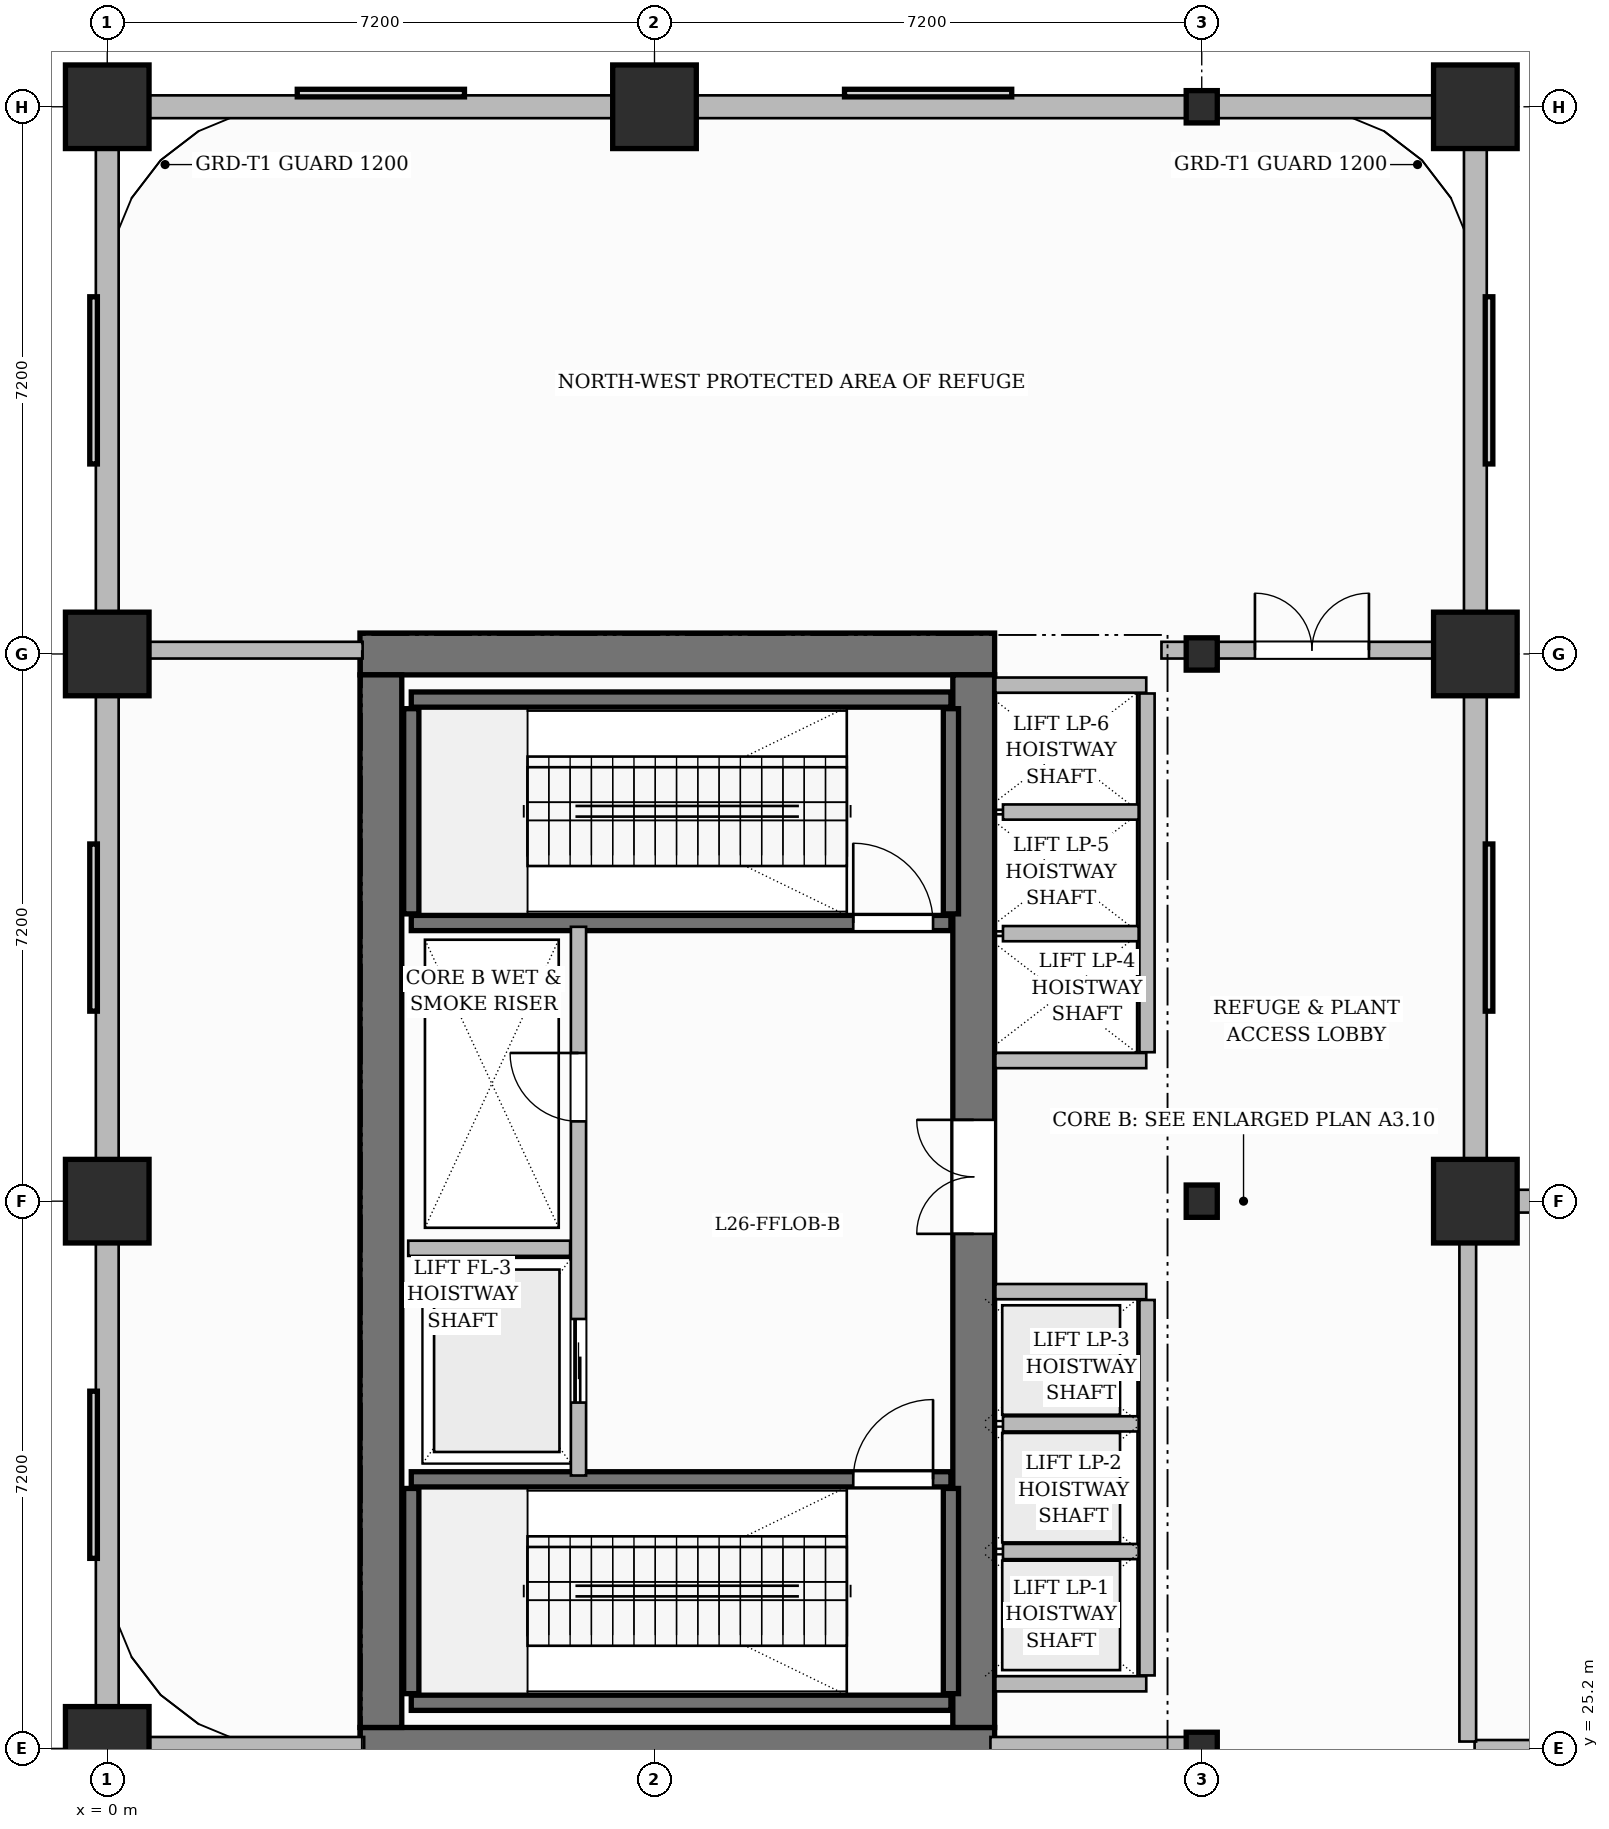
"""IFC4 building model, lengths in metres.
Left out: names, types, materials, properties, quantities, classifications, styles, units other than length and angle.
Written with IfcOpenShell. Run it as: python <this file> out.ifc"""

import sys

from ifc_helpers import new_model, si_unit, direction, frame, frame_2d, origin, origin_2d, place, context, subcontext, project, spatial, rectangle, i_section, extrude, source, transform, mapped, element, fill, save


model = new_model("IFC4")
c1 = context("Model", 3, precision=1e-05, world=origin(), true_north=direction((0.0, 1.0)))
c2 = subcontext(c1, "Body", "Model", "MODEL_VIEW")
j1 = project(units=[si_unit("LENGTHUNIT", "METRE"), si_unit("PLANEANGLEUNIT", "RADIAN")], contexts=[c1])
p1 = place(None, origin())
s1 = spatial("IfcSite", under=j1, at=p1, CompositionType="ELEMENT")
p2 = place(p1, origin())
s2 = spatial("IfcBuilding", under=s1, at=p2, CompositionType="ELEMENT")
p3 = place(p2, frame((0.0, 0.0, 106.4)))
s3 = spatial("IfcBuildingStorey", under=s2, at=p3, CompositionType="ELEMENT", Elevation=106.4)
for number, where, z_axis, x_axis in (
    (1, (3.325, 25.2, 0.0), (0.0, 0.0, 1.0), (1.0, 0.0, 0.0)),
    (2, (3.325, 39.6, 0.0), (0.0, 0.0, 1.0), (1.0, 0.0, 0.0)),
):
    element("IfcWall", number, at=place(p3, frame(where, z_axis=z_axis, x_axis=x_axis)), inside=s3, PredefinedType="SHEAR", context=c2, shape_type="SweptSolid", body=[
        extrude(rectangle(XDim=8.35, YDim=0.55, at=frame_2d((4.175, 0.0))), origin(), (0.0, 0.0, 1.0), 5.4),
    ])
p4 = place(p3, frame((3.6, 25.475, 0.0), z_axis=(0.0, 0.0, 1.0), x_axis=(0.0, 1.0, 0.0)))
e3 = element("IfcWall", 3, at=p4, inside=s3, PredefinedType="SHEAR", context=c2, shape_type="SweptSolid", body=[
    extrude(rectangle(XDim=13.85, YDim=0.55, at=frame_2d((6.925, 0.0))), origin(), (0.0, 0.0, 1.0), 5.4),
])
p5 = place(p3, frame((11.4, 25.475, 0.0), z_axis=(0.0, 0.0, 1.0), x_axis=(0.0, 1.0, 0.0)))
e4 = element("IfcWall", 4, at=p5, inside=s3, PredefinedType="SHEAR", context=c2, shape_type="SweptSolid", body=[
    extrude(rectangle(XDim=13.85, YDim=0.55, at=frame_2d((6.925, 0.0))), origin(), (0.0, 0.0, 1.0), 5.4),
])
p6 = place(p5, frame((6.495, 0.0, 0.0)))
e5 = element("IfcOpeningElement", 5, at=p6, cuts=e4, PredefinedType="OPENING", context=c2, shape_type="SweptSolid", body=[
    extrude(rectangle(XDim=1.5, YDim=2.2, at=frame_2d((0.75, 1.1))), frame((0.0, 0.285, 0.0), z_axis=(0.0, -1.0, 0.0), x_axis=(1.0, 0.0, 0.0)), (0.0, 0.0, 1.0), 0.57),
])
m1 = source(origin(), c2, "Body", "SweptSolid", [
    extrude(rectangle(XDim=1.1, YDim=1.1, at=origin_2d()), origin(), (0.0, 0.0, 1.0), 5.4),
])
for number, where, z_axis, x_axis in (
    (6, (0.0, 25.2, 0.0), (0.0, 0.0, 1.0), (1.0, 0.0, 0.0)),
    (7, (0.0, 32.4, 0.0), (0.0, 0.0, 1.0), (1.0, 0.0, 0.0)),
    (8, (0.0, 39.6, 0.0), (0.0, 0.0, 1.0), (1.0, 0.0, 0.0)),
    (9, (0.0, 46.8, 0.0), (0.0, 0.0, 1.0), (1.0, 0.0, 0.0)),
    (10, (7.2, 46.8, 0.0), (0.0, 0.0, 1.0), (1.0, 0.0, 0.0)),
):
    element("IfcColumn", number, at=place(p3, frame(where, z_axis=z_axis, x_axis=x_axis)), inside=s3, PredefinedType="COLUMN", context=c2, shape_type="MappedRepresentation", body=[
        mapped(m1, transform((0.0, 0.0, 0.0), scale=1.0)),
    ])
m2 = source(origin(), c2, "Body", "SweptSolid", [
    extrude(i_section(OverallWidth=0.409, OverallDepth=0.425, WebThickness=0.024, FlangeThickness=0.039, FilletRadius=0.015, at=origin_2d()), origin(), (0.0, 0.0, 1.0), 5.4),
])
for number, where, z_axis, x_axis in (
    (11, (14.4, 25.2, 0.0), (0.0, 0.0, 1.0), (1.0, 0.0, 0.0)),
    (12, (14.4, 32.4, 0.0), (0.0, 0.0, 1.0), (1.0, 0.0, 0.0)),
    (13, (14.4, 39.6, 0.0), (0.0, 0.0, 1.0), (1.0, 0.0, 0.0)),
    (14, (14.4, 46.8, 0.0), (0.0, 0.0, 1.0), (1.0, 0.0, 0.0)),
):
    element("IfcColumn", number, at=place(p3, frame(where, z_axis=z_axis, x_axis=x_axis)), inside=s3, PredefinedType="COLUMN", context=c2, shape_type="MappedRepresentation", body=[
        mapped(m2, transform((0.0, 0.0, 0.0), scale=1.0)),
    ])
for number, where, z_axis, x_axis in (
    (15, (18.0, 32.4, 0.0), (0.0, 0.0, 1.0), (1.0, 0.0, 0.0)),
    (16, (18.0, 39.6, 0.0), (0.0, 0.0, 1.0), (1.0, 0.0, 0.0)),
    (17, (18.0, 46.8, 0.0), (0.0, 0.0, 1.0), (1.0, 0.0, 0.0)),
):
    element("IfcColumn", number, at=place(p3, frame(where, z_axis=z_axis, x_axis=x_axis)), inside=s3, PredefinedType="COLUMN", context=c2, shape_type="MappedRepresentation", body=[
        mapped(m1, transform((0.0, 0.0, 0.0), scale=1.0)),
    ])
p7 = place(p3, frame((4.0, 25.8, 0.0), z_axis=(0.0, 0.0, 1.0), x_axis=(1.0, 0.0, 0.0)))
e18 = element("IfcWall", 18, at=p7, inside=s3, PredefinedType="SHEAR", context=c2, shape_type="SweptSolid", body=[
    extrude(rectangle(XDim=7.1, YDim=0.2, at=frame_2d((3.55, 0.0))), origin(), (0.0, 0.0, 1.0), 5.4),
])
for number, where, z_axis, x_axis in (
    (19, (4.0, 25.92, 0.0), (0.0, 0.0, 1.0), (0.0, 1.0, 0.0)),
    (20, (11.1, 25.92, 0.0), (0.0, 0.0, 1.0), (0.0, 1.0, 0.0)),
):
    element("IfcWall", number, at=place(p3, frame(where, z_axis=z_axis, x_axis=x_axis)), inside=s3, PredefinedType="SHEAR", context=c2, shape_type="SweptSolid", body=[
        extrude(rectangle(XDim=2.7, YDim=0.2, at=frame_2d((1.35, 0.0))), origin(), (0.0, 0.0, 1.0), 5.4),
    ])
p8 = place(p3, frame((4.0, 28.74, 0.0), z_axis=(0.0, 0.0, 1.0), x_axis=(1.0, 0.0, 0.0)))
e21 = element("IfcWall", 21, at=p8, inside=s3, PredefinedType="SHEAR", context=c2, shape_type="SweptSolid", body=[
    extrude(rectangle(XDim=7.1, YDim=0.2, at=frame_2d((3.55, 0.0))), origin(), (0.0, 0.0, 1.0), 5.4),
])
p9 = place(p8, frame((5.815, 0.0, 0.0)))
e22 = element("IfcOpeningElement", 22, at=p9, cuts=e21, PredefinedType="OPENING", context=c2, shape_type="SweptSolid", body=[
    extrude(rectangle(XDim=1.05, YDim=2.2, at=frame_2d((0.525, 1.1))), frame((0.0, 0.11, 0.0), z_axis=(0.0, -1.0, 0.0), x_axis=(1.0, 0.0, 0.0)), (0.0, 0.0, 1.0), 0.22),
])
p10 = place(p3, frame((4.0, 39.0, 0.0), z_axis=(0.0, 0.0, 1.0), x_axis=(1.0, 0.0, 0.0)))
e23 = element("IfcWall", 23, at=p10, inside=s3, PredefinedType="SHEAR", context=c2, shape_type="SweptSolid", body=[
    extrude(rectangle(XDim=7.1, YDim=0.2, at=frame_2d((3.55, 0.0))), origin(), (0.0, 0.0, 1.0), 5.4),
])
for number, where, z_axis, x_axis in (
    (24, (4.0, 36.18, 0.0), (0.0, 0.0, 1.0), (0.0, 1.0, 0.0)),
    (25, (11.1, 36.18, 0.0), (0.0, 0.0, 1.0), (0.0, 1.0, 0.0)),
):
    element("IfcWall", number, at=place(p3, frame(where, z_axis=z_axis, x_axis=x_axis)), inside=s3, PredefinedType="SHEAR", context=c2, shape_type="SweptSolid", body=[
        extrude(rectangle(XDim=2.7, YDim=0.2, at=frame_2d((1.35, 0.0))), origin(), (0.0, 0.0, 1.0), 5.4),
    ])
p11 = place(p3, frame((4.0, 36.06, 0.0), z_axis=(0.0, 0.0, 1.0), x_axis=(1.0, 0.0, 0.0)))
e26 = element("IfcWall", 26, at=p11, inside=s3, PredefinedType="SHEAR", context=c2, shape_type="SweptSolid", body=[
    extrude(rectangle(XDim=7.1, YDim=0.2, at=frame_2d((3.55, 0.0))), origin(), (0.0, 0.0, 1.0), 5.4),
])
p12 = place(p11, frame((5.815, 0.0, 0.0)))
e27 = element("IfcOpeningElement", 27, at=p12, cuts=e26, PredefinedType="OPENING", context=c2, shape_type="SweptSolid", body=[
    extrude(rectangle(XDim=1.05, YDim=2.2, at=frame_2d((0.525, 1.1))), frame((0.0, 0.11, 0.0), z_axis=(0.0, -1.0, 0.0), x_axis=(1.0, 0.0, 0.0)), (0.0, 0.0, 1.0), 0.22),
])
p13 = place(p3, frame((6.2, 28.79, 0.0), z_axis=(0.0, 0.0, 1.0), x_axis=(0.0, 1.0, 0.0)))
e28 = element("IfcWall", 28, at=p13, inside=s3, PredefinedType="PARTITIONING", context=c2, shape_type="SweptSolid", body=[
    extrude(rectangle(XDim=7.22, YDim=0.2, at=frame_2d((3.61, 0.0))), origin(), (0.0, 0.0, 1.0), 5.15),
])
p14 = place(p13, frame((4.66, 0.0, 0.0)))
e29 = element("IfcOpeningElement", 29, at=p14, cuts=e28, PredefinedType="OPENING", context=c2, shape_type="SweptSolid", body=[
    extrude(rectangle(XDim=0.9, YDim=2.1, at=frame_2d((0.45, 1.05))), frame((0.0, 0.11, 0.0), z_axis=(0.0, -1.0, 0.0), x_axis=(1.0, 0.0, 0.0)), (0.0, 0.0, 1.0), 0.22),
])
p15 = place(p13, frame((0.96, 0.0, 0.0)))
e30 = element("IfcOpeningElement", 30, at=p15, cuts=e28, PredefinedType="OPENING", context=c2, shape_type="SweptSolid", body=[
    extrude(rectangle(XDim=1.1, YDim=2.2, at=frame_2d((0.55, 1.1))), frame((0.0, 0.11, 0.0), z_axis=(0.0, -1.0, 0.0), x_axis=(1.0, 0.0, 0.0)), (0.0, 0.0, 1.0), 0.22),
])
p16 = place(p3, frame((3.96, 31.78, 0.0), z_axis=(0.0, 0.0, 1.0), x_axis=(1.0, 0.0, 0.0)))
e31 = element("IfcWall", 31, at=p16, inside=s3, PredefinedType="PARTITIONING", context=c2, shape_type="SweptSolid", body=[
    extrude(rectangle(XDim=2.13, YDim=0.2, at=frame_2d((1.065, 0.0))), origin(), (0.0, 0.0, 1.0), 5.15),
])
for number, where, z_axis, x_axis in (
    (32, (11.685, 26.05, 0.0), (0.0, 0.0, 1.0), (1.0, 0.0, 0.0)),
    (33, (11.685, 31.21, 0.0), (0.0, 0.0, 1.0), (1.0, 0.0, 0.0)),
):
    element("IfcWall", number, at=place(p3, frame(where, z_axis=z_axis, x_axis=x_axis)), inside=s3, PredefinedType="PARTITIONING", context=c2, shape_type="SweptSolid", body=[
        extrude(rectangle(XDim=1.985, YDim=0.2, at=frame_2d((0.992, 0.0))), origin(), (0.0, 0.0, 1.0), 5.15),
    ])
p17 = place(p3, frame((13.68, 26.16, 0.0), z_axis=(0.0, 0.0, 1.0), x_axis=(0.0, 1.0, 0.0)))
e34 = element("IfcWall", 34, at=p17, inside=s3, PredefinedType="PARTITIONING", context=c2, shape_type="SweptSolid", body=[
    extrude(rectangle(XDim=4.94, YDim=0.2, at=frame_2d((2.47, 0.0))), origin(), (0.0, 0.0, 1.0), 5.15),
])
for number, where, z_axis, x_axis in (
    (35, (11.785, 27.79, 0.0), (0.0, 0.0, 1.0), (1.0, 0.0, 0.0)),
    (36, (11.785, 29.47, 0.0), (0.0, 0.0, 1.0), (1.0, 0.0, 0.0)),
):
    element("IfcWall", number, at=place(p3, frame(where, z_axis=z_axis, x_axis=x_axis)), inside=s3, PredefinedType="PARTITIONING", context=c2, shape_type="SweptSolid", body=[
        extrude(rectangle(XDim=1.785, YDim=0.2, at=frame_2d((0.893, 0.0))), origin(), (0.0, 0.0, 1.0), 5.15),
    ])
for number, where, z_axis, x_axis in (
    (37, (11.685, 34.25, 0.0), (0.0, 0.0, 1.0), (1.0, 0.0, 0.0)),
    (38, (11.685, 39.19, 0.0), (0.0, 0.0, 1.0), (1.0, 0.0, 0.0)),
):
    element("IfcWall", number, at=place(p3, frame(where, z_axis=z_axis, x_axis=x_axis)), inside=s3, PredefinedType="PARTITIONING", context=c2, shape_type="SweptSolid", body=[
        extrude(rectangle(XDim=1.985, YDim=0.2, at=frame_2d((0.992, 0.0))), origin(), (0.0, 0.0, 1.0), 5.15),
    ])
p18 = place(p3, frame((13.68, 34.36, 0.0), z_axis=(0.0, 0.0, 1.0), x_axis=(0.0, 1.0, 0.0)))
e39 = element("IfcWall", 39, at=p18, inside=s3, PredefinedType="PARTITIONING", context=c2, shape_type="SweptSolid", body=[
    extrude(rectangle(XDim=4.72, YDim=0.2, at=frame_2d((2.36, 0.0))), origin(), (0.0, 0.0, 1.0), 5.15),
])
for number, where, z_axis, x_axis in (
    (40, (11.785, 35.92, 0.0), (0.0, 0.0, 1.0), (1.0, 0.0, 0.0)),
    (41, (11.785, 37.52, 0.0), (0.0, 0.0, 1.0), (1.0, 0.0, 0.0)),
):
    element("IfcWall", number, at=place(p3, frame(where, z_axis=z_axis, x_axis=x_axis)), inside=s3, PredefinedType="PARTITIONING", context=c2, shape_type="SweptSolid", body=[
        extrude(rectangle(XDim=1.785, YDim=0.2, at=frame_2d((0.893, 0.0))), origin(), (0.0, 0.0, 1.0), 5.15),
    ])
p19 = place(p3, frame((17.99, 25.2, 0.0), z_axis=(0.0, 0.0, 1.0), x_axis=(1.0, 0.0, 0.0)))
e42 = element("IfcWall", 42, at=p19, inside=s3, PredefinedType="PARTITIONING", context=c2, shape_type="SweptSolid", body=[
    extrude(rectangle(XDim=16.47, YDim=0.22, at=frame_2d((8.235, 0.0))), origin(), (0.0, 0.0, 1.0), 5.15),
])
p20 = place(p19, frame((1.46, 0.0, 0.0)))
e43 = element("IfcOpeningElement", 43, at=p20, cuts=e42, PredefinedType="OPENING", context=c2, shape_type="SweptSolid", body=[
    extrude(rectangle(XDim=1.5, YDim=2.2, at=frame_2d((0.75, 1.1))), frame((0.0, 0.12, 0.0), z_axis=(0.0, -1.0, 0.0), x_axis=(1.0, 0.0, 0.0)), (0.0, 0.0, 1.0), 0.24),
])
p21 = place(p3, frame((17.9, 25.29, 0.0), z_axis=(0.0, 0.0, 1.0), x_axis=(0.0, 1.0, 0.0)))
e44 = element("IfcWall", 44, at=p21, inside=s3, PredefinedType="PARTITIONING", context=c2, shape_type="SweptSolid", body=[
    extrude(rectangle(XDim=6.87, YDim=0.22, at=frame_2d((3.435, 0.0))), origin(), (0.0, 0.0, 1.0), 5.15),
])
p22 = place(p3, frame((13.87, 39.65, 0.0), z_axis=(0.0, 0.0, 1.0), x_axis=(1.0, 0.0, 0.0)))
e45 = element("IfcWall", 45, at=p22, inside=s3, PredefinedType="PARTITIONING", context=c2, shape_type="SweptSolid", body=[
    extrude(rectangle(XDim=3.89, YDim=0.22, at=frame_2d((1.945, 0.0))), origin(), (0.0, 0.0, 1.0), 4.485),
])
p23 = place(p22, frame((1.23, 0.0, 0.0)))
e46 = element("IfcOpeningElement", 46, at=p23, cuts=e45, PredefinedType="OPENING", context=c2, shape_type="SweptSolid", body=[
    extrude(rectangle(XDim=1.5, YDim=2.2, at=frame_2d((0.75, 1.1))), frame((0.0, 0.12, 0.0), z_axis=(0.0, -1.0, 0.0), x_axis=(1.0, 0.0, 0.0)), (0.0, 0.0, 1.0), 0.24),
])
p24 = place(p3, frame((0.29, 39.65, 0.0), z_axis=(0.0, 0.0, 1.0), x_axis=(1.0, 0.0, 0.0)))
e47 = element("IfcWall", 47, at=p24, inside=s3, PredefinedType="PARTITIONING", context=c2, shape_type="SweptSolid", body=[
    extrude(rectangle(XDim=3.07, YDim=0.22, at=frame_2d((1.535, 0.0))), origin(), (0.0, 0.0, 1.0), 5.15),
])
p25 = place(p3, frame((11.62, 25.2, 0.0), z_axis=(0.0, 0.0, 1.0), x_axis=(1.0, 0.0, 0.0)))
e48 = element("IfcWall", 48, at=p25, inside=s3, PredefinedType="SOLIDWALL", context=c2, shape_type="SweptSolid", body=[
    extrude(rectangle(XDim=2.78, YDim=0.3, at=frame_2d((1.39, 0.0))), origin(), (0.0, 0.0, 1.0), 4.485),
])
p26 = place(p3, frame((0.0, 25.2, 0.0), z_axis=(0.0, 0.0, 1.0), x_axis=(1.0, 0.0, 0.0)))
e49 = element("IfcWall", 49, at=p26, inside=s3, PredefinedType="SOLIDWALL", context=c2, shape_type="SweptSolid", body=[
    extrude(rectangle(XDim=3.38, YDim=0.3, at=frame_2d((1.69, 0.0))), origin(), (0.0, 0.0, 1.0), 5.15),
])
p27 = place(p3, frame((0.0, 25.25, 0.0), z_axis=(0.0, 0.0, 1.0), x_axis=(0.0, 1.0, 0.0)))
e50 = element("IfcWall", 50, at=p27, inside=s3, PredefinedType="SOLIDWALL", context=c2, shape_type="SweptSolid", body=[
    extrude(rectangle(XDim=21.5, YDim=0.3, at=frame_2d((10.75, 0.0))), origin(), (0.0, 0.0, 1.0), 4.485),
])
p28 = place(p3, frame((0.0, 46.8, 0.0), z_axis=(0.0, 0.0, 1.0), x_axis=(1.0, 0.0, 0.0)))
e51 = element("IfcWall", 51, at=p28, inside=s3, PredefinedType="SOLIDWALL", context=c2, shape_type="SweptSolid", body=[
    extrude(rectangle(XDim=18.0, YDim=0.3, at=frame_2d((9.0, 0.0))), origin(), (0.0, 0.0, 1.0), 4.485),
])
p29 = place(p3, frame((18.0, 32.4, 0.0), z_axis=(0.0, 0.0, 1.0), x_axis=(0.0, 1.0, 0.0)))
e52 = element("IfcWall", 52, at=p29, inside=s3, PredefinedType="SOLIDWALL", context=c2, shape_type="SweptSolid", body=[
    extrude(rectangle(XDim=14.35, YDim=0.3, at=frame_2d((7.175, 0.0))), origin(), (0.0, 0.0, 1.0), 5.15),
])
p30 = place(p3, frame((18.0, 32.4, 0.0), z_axis=(0.0, 0.0, 1.0), x_axis=(1.0, 0.0, 0.0)))
e53 = element("IfcWall", 53, at=p30, inside=s3, PredefinedType="SOLIDWALL", context=c2, shape_type="SweptSolid", body=[
    extrude(rectangle(XDim=16.8, YDim=0.3, at=frame_2d((8.4, 0.0))), origin(), (0.0, 0.0, 1.0), 4.335),
])
m3 = source(origin(), c2, "Body", "SweptSolid", [
    extrude(rectangle(XDim=1.05, YDim=2.2, at=frame_2d((0.525, 1.1))), frame((0.0, 0.025, 0.0), z_axis=(0.0, -1.0, 0.0), x_axis=(1.0, 0.0, 0.0)), (0.0, 0.0, 1.0), 0.05),
])
p31 = place(p9, origin())
e54 = element("IfcDoor", 54, at=p31, inside=s3, OperationType="SINGLE_SWING_RIGHT", PredefinedType="DOOR", context=c2, shape_type="MappedRepresentation", body=[
    mapped(m3, transform((0.0, 0.0, 0.0), scale=1.0)),
])
fill(e22, e54)
p32 = place(p12, origin())
e55 = element("IfcDoor", 55, at=p32, inside=s3, OperationType="SINGLE_SWING_LEFT", PredefinedType="DOOR", context=c2, shape_type="MappedRepresentation", body=[
    mapped(m3, transform((0.0, 0.0, 0.0), scale=1.0)),
])
fill(e27, e55)
m4 = source(origin(), c2, "Body", "SweptSolid", [
    extrude(rectangle(XDim=0.9, YDim=2.1, at=frame_2d((0.45, 1.05))), frame((0.0, 0.025, 0.0), z_axis=(0.0, -1.0, 0.0), x_axis=(1.0, 0.0, 0.0)), (0.0, 0.0, 1.0), 0.05),
])
p33 = place(p14, origin())
e56 = element("IfcDoor", 56, at=p33, inside=s3, OperationType="SINGLE_SWING_RIGHT", PredefinedType="DOOR", context=c2, shape_type="MappedRepresentation", body=[
    mapped(m4, transform((0.0, 0.0, 0.0), scale=1.0)),
])
fill(e29, e56)
m5 = source(origin(), c2, "Body", "SweptSolid", [
    extrude(rectangle(XDim=1.5, YDim=2.2, at=frame_2d((0.75, 1.1))), frame((0.0, 0.025, 0.0), z_axis=(0.0, -1.0, 0.0), x_axis=(1.0, 0.0, 0.0)), (0.0, 0.0, 1.0), 0.05),
])
p34 = place(p6, origin())
e57 = element("IfcDoor", 57, at=p34, inside=s3, OperationType="DOUBLE_DOOR_SINGLE_SWING", PredefinedType="DOOR", context=c2, shape_type="MappedRepresentation", body=[
    mapped(m5, transform((0.0, 0.0, 0.0), scale=1.0)),
])
fill(e5, e57)
p35 = place(p23, origin())
e58 = element("IfcDoor", 58, at=p35, inside=s3, OperationType="DOUBLE_DOOR_SINGLE_SWING", PredefinedType="DOOR", context=c2, shape_type="MappedRepresentation", body=[
    mapped(m5, transform((0.0, 0.0, 0.0), scale=1.0)),
])
fill(e46, e58)
m6 = source(origin(), c2, "Body", "SweptSolid", [
    extrude(rectangle(XDim=1.1, YDim=2.2, at=frame_2d((0.55, 1.1))), frame((0.0, 0.025, 0.0), z_axis=(0.0, -1.0, 0.0), x_axis=(1.0, 0.0, 0.0)), (0.0, 0.0, 1.0), 0.05),
])
p36 = place(p15, origin())
e59 = element("IfcDoor", 59, at=p36, inside=s3, OperationType="SLIDING_TO_LEFT", PredefinedType="DOOR", context=c2, shape_type="MappedRepresentation", body=[
    mapped(m6, transform((0.0, 0.0, 0.0), scale=1.0)),
])
fill(e30, e59)
save(model, sys.argv[1])
